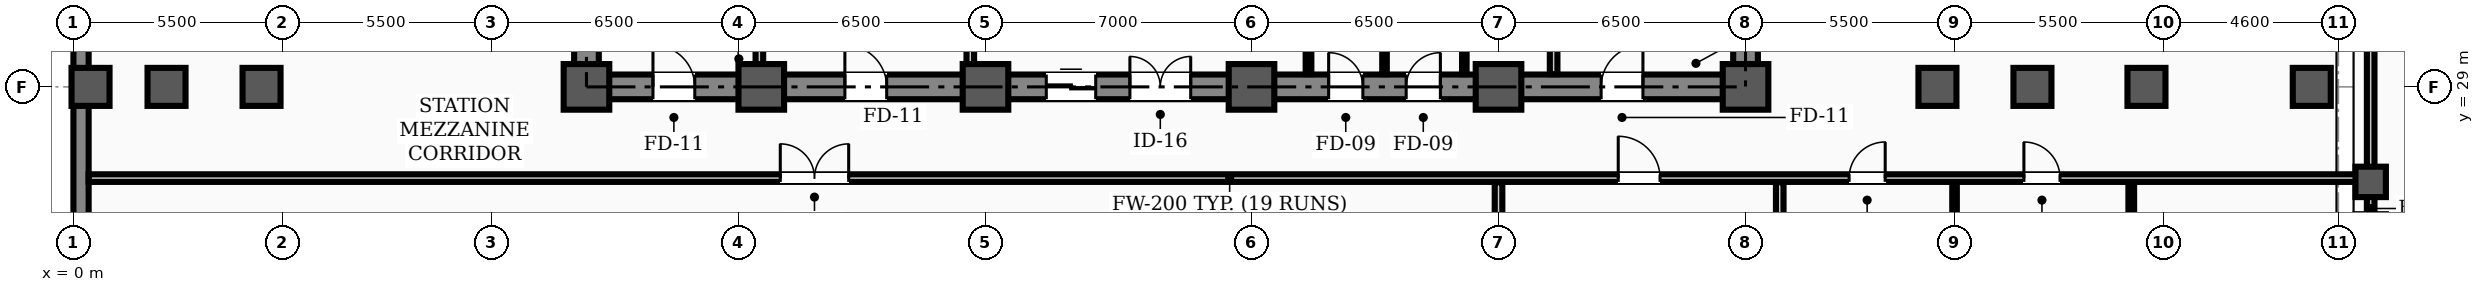
"""IFC4 building model, lengths in metres.
Left out: names, types, materials, properties, quantities, classifications, styles, units other than length and angle.
Written with IfcOpenShell. Run it as: python <this file> out.ifc"""

import sys

from ifc_helpers import new_model, si_unit, direction, frame, frame_2d, origin, origin_2d, place, context, subcontext, project, spatial, rectangle, hollow_rectangle, extrude, element, fill, save


model = new_model("IFC4")
c1 = context("Model", 3, precision=1e-05, world=origin(), true_north=direction((0.0, 1.0)))
c2 = subcontext(c1, "Body", "Model", "MODEL_VIEW")
j1 = project(units=[si_unit("LENGTHUNIT", "METRE"), si_unit("PLANEANGLEUNIT", "RADIAN")], contexts=[c1])
p1 = place(None, origin())
s1 = spatial("IfcSite", under=j1, at=p1, CompositionType="ELEMENT")
p2 = place(p1, origin())
s2 = spatial("IfcBuilding", under=s1, at=p2, CompositionType="ELEMENT")
p3 = place(p2, frame((0.0, 0.0, -10.2)))
s3 = spatial("IfcBuildingStorey", under=s2, at=p3, CompositionType="ELEMENT", Elevation=-10.2)
for number, where, z_axis, x_axis in (
    (1, (13.5, 29.0, 0.0), (0.0, 0.0, 1.0), (1.0, 0.0, 0.0)),
    (2, (18.1, 29.0, 0.0), (0.0, 0.0, 1.0), (1.0, 0.0, 0.0)),
    (3, (24.0, 29.0, 0.0), (0.0, 0.0, 1.0), (1.0, 0.0, 0.0)),
    (4, (31.0, 29.0, 0.0), (0.0, 0.0, 1.0), (1.0, 0.0, 0.0)),
    (5, (37.5, 29.0, 0.0), (0.0, 0.0, 1.0), (1.0, 0.0, 0.0)),
    (6, (44.0, 29.0, 0.0), (0.0, 0.0, 1.0), (1.0, 0.0, 0.0)),
):
    element("IfcColumn", number, at=place(p3, frame(where, z_axis=z_axis, x_axis=x_axis)), inside=s3, PredefinedType="COLUMN", context=c2, shape_type="SweptSolid", body=[
        extrude(hollow_rectangle(XDim=1.2, YDim=1.2, WallThickness=0.04, InnerFilletRadius=0.02, OuterFilletRadius=0.06, at=origin_2d()), origin(), (0.0, 0.0, 1.0), 5.2),
    ])
for number, where, z_axis, x_axis in (
    (7, (0.45, 29.0, 0.0), (0.0, 0.0, 1.0), (1.0, 0.0, 0.0)),
    (8, (2.45, 29.0, 0.0), (0.0, 0.0, 1.0), (1.0, 0.0, 0.0)),
    (9, (4.95, 29.0, 0.0), (0.0, 0.0, 1.0), (1.0, 0.0, 0.0)),
    (10, (49.05, 29.0, 0.0), (0.0, 0.0, 1.0), (1.0, 0.0, 0.0)),
    (11, (51.55, 29.0, 0.0), (0.0, 0.0, 1.0), (1.0, 0.0, 0.0)),
    (12, (54.55, 29.0, 0.0), (0.0, 0.0, 1.0), (1.0, 0.0, 0.0)),
    (13, (58.9, 29.0, 0.0), (0.0, 0.0, 1.0), (1.0, 0.0, 0.0)),
):
    element("IfcColumn", number, at=place(p3, frame(where, z_axis=z_axis, x_axis=x_axis)), inside=s3, PredefinedType="COLUMN", context=c2, shape_type="SweptSolid", body=[
        extrude(rectangle(XDim=1.0, YDim=1.0, at=origin_2d()), origin(), (0.0, 0.0, 1.0), 5.2),
    ])
p4 = place(p3, frame((60.45, 26.5, 0.0), z_axis=(0.0, 0.0, 1.0), x_axis=(1.0, 0.0, 0.0)))
e14 = element("IfcColumn", 14, at=p4, inside=s3, PredefinedType="COLUMN", context=c2, shape_type="SweptSolid", body=[
    extrude(rectangle(XDim=0.8, YDim=0.8, at=origin_2d()), origin(), (0.0, 0.0, 1.0), 5.2),
])
p5 = place(p3, frame((0.2, 51.4, 0.0), z_axis=(0.0, 0.0, 1.0), x_axis=(0.0, -1.0, 0.0)))
e15 = element("IfcWall", 15, at=p5, inside=s3, PredefinedType="SOLIDWALL", context=c2, shape_type="SweptSolid", body=[
    extrude(rectangle(XDim=51.2, YDim=0.4, at=frame_2d((25.6, 0.0))), origin(), (0.0, 0.0, 1.0), 4.92),
])
p6 = place(p3, frame((13.5, 29.0, 0.0), z_axis=(0.0, 0.0, 1.0), x_axis=(1.0, 0.0, 0.0)))
e16 = element("IfcWall", 16, at=p6, inside=s3, PredefinedType="SHEAR", context=c2, shape_type="SweptSolid", body=[
    extrude(rectangle(XDim=30.5, YDim=0.65, at=frame_2d((15.25, 0.0))), origin(), (0.0, 0.0, 1.0), 4.92),
])
p7 = place(p6, frame((1.75, 0.0, 0.0)))
e17 = element("IfcOpeningElement", 17, at=p7, cuts=e16, PredefinedType="OPENING", context=c2, shape_type="SweptSolid", body=[
    extrude(rectangle(XDim=1.1, YDim=2.08, at=frame_2d((0.55, 1.04))), frame((0.0, 0.335, 0.0), z_axis=(0.0, -1.0, 0.0), x_axis=(1.0, 0.0, 0.0)), (0.0, 0.0, 1.0), 0.67),
])
p8 = place(p6, frame((26.7, 0.0, 0.0)))
e18 = element("IfcOpeningElement", 18, at=p8, cuts=e16, PredefinedType="OPENING", context=c2, shape_type="SweptSolid", body=[
    extrude(rectangle(XDim=1.1, YDim=2.08, at=frame_2d((0.55, 1.04))), frame((0.0, 0.335, 0.0), z_axis=(0.0, -1.0, 0.0), x_axis=(1.0, 0.0, 0.0)), (0.0, 0.0, 1.0), 0.67),
])
p9 = place(p6, frame((6.8, 0.0, 0.0)))
e19 = element("IfcOpeningElement", 19, at=p9, cuts=e16, PredefinedType="OPENING", context=c2, shape_type="SweptSolid", body=[
    extrude(rectangle(XDim=1.1, YDim=2.08, at=frame_2d((0.55, 1.04))), frame((0.0, 0.335, 0.0), z_axis=(0.0, -1.0, 0.0), x_axis=(1.0, 0.0, 0.0)), (0.0, 0.0, 1.0), 0.67),
])
p10 = place(p6, frame((14.3, 0.0, 0.0)))
e20 = element("IfcOpeningElement", 20, at=p10, cuts=e16, PredefinedType="OPENING", context=c2, shape_type="SweptSolid", body=[
    extrude(rectangle(XDim=1.6, YDim=2.08, at=frame_2d((0.8, 1.04))), frame((0.0, 0.335, 0.0), z_axis=(0.0, -1.0, 0.0), x_axis=(1.0, 0.0, 0.0)), (0.0, 0.0, 1.0), 0.67),
])
p11 = place(p6, frame((19.53, 0.0, 0.0)))
e21 = element("IfcOpeningElement", 21, at=p11, cuts=e16, PredefinedType="OPENING", context=c2, shape_type="SweptSolid", body=[
    extrude(rectangle(XDim=0.9, YDim=2.08, at=frame_2d((0.45, 1.04))), frame((0.0, 0.335, 0.0), z_axis=(0.0, -1.0, 0.0), x_axis=(1.0, 0.0, 0.0)), (0.0, 0.0, 1.0), 0.67),
])
p12 = place(p6, frame((21.57, 0.0, 0.0)))
e22 = element("IfcOpeningElement", 22, at=p12, cuts=e16, PredefinedType="OPENING", context=c2, shape_type="SweptSolid", body=[
    extrude(rectangle(XDim=0.9, YDim=2.08, at=frame_2d((0.45, 1.04))), frame((0.0, 0.335, 0.0), z_axis=(0.0, -1.0, 0.0), x_axis=(1.0, 0.0, 0.0)), (0.0, 0.0, 1.0), 0.67),
])
p13 = place(p6, frame((12.1, 0.0, 0.0)))
e23 = element("IfcOpeningElement", 23, at=p13, cuts=e16, PredefinedType="OPENING", context=c2, shape_type="SweptSolid", body=[
    extrude(rectangle(XDim=1.3, YDim=2.08, at=frame_2d((0.65, 1.04))), frame((0.0, 0.335, 0.0), z_axis=(0.0, -1.0, 0.0), x_axis=(1.0, 0.0, 0.0)), (0.0, 0.0, 1.0), 0.67),
])
for number, where, z_axis, x_axis in (
    (24, (13.5, 29.35, 0.0), (0.0, 0.0, 1.0), (0.0, 1.0, 0.0)),
    (25, (44.0, 29.35, 0.0), (0.0, 0.0, 1.0), (0.0, 1.0, 0.0)),
):
    element("IfcWall", number, at=place(p3, frame(where, z_axis=z_axis, x_axis=x_axis)), inside=s3, PredefinedType="SHEAR", context=c2, shape_type="SweptSolid", body=[
        extrude(rectangle(XDim=8.6, YDim=0.65, at=frame_2d((4.3, 0.0))), origin(), (0.0, 0.0, 1.0), 4.92),
    ])
p14 = place(p3, frame((0.4, 26.6, 0.0), z_axis=(0.0, 0.0, 1.0), x_axis=(1.0, 0.0, 0.0)))
e26 = element("IfcWall", 26, at=p14, inside=s3, PredefinedType="STANDARD", context=c2, shape_type="SweptSolid", body=[
    extrude(rectangle(XDim=60.05, YDim=0.2, at=frame_2d((30.025, 0.0))), origin(), (0.0, 0.0, 1.0), 4.2),
])
p15 = place(p14, frame((18.2, 0.0, 0.0)))
e27 = element("IfcOpeningElement", 27, at=p15, cuts=e26, PredefinedType="OPENING", context=c2, shape_type="SweptSolid", body=[
    extrude(rectangle(XDim=1.8, YDim=2.08, at=frame_2d((0.9, 1.04))), frame((0.0, 0.11, 0.0), z_axis=(0.0, -1.0, 0.0), x_axis=(1.0, 0.0, 0.0)), (0.0, 0.0, 1.0), 0.22),
])
p16 = place(p14, frame((40.25, 0.0, 0.0)))
e28 = element("IfcOpeningElement", 28, at=p16, cuts=e26, PredefinedType="OPENING", context=c2, shape_type="SweptSolid", body=[
    extrude(rectangle(XDim=1.1, YDim=2.08, at=frame_2d((0.55, 1.04))), frame((0.0, 0.11, 0.0), z_axis=(0.0, -1.0, 0.0), x_axis=(1.0, 0.0, 0.0)), (0.0, 0.0, 1.0), 0.22),
])
p17 = place(p14, frame((46.325, 0.0, 0.0)))
e29 = element("IfcOpeningElement", 29, at=p17, cuts=e26, PredefinedType="OPENING", context=c2, shape_type="SweptSolid", body=[
    extrude(rectangle(XDim=0.95, YDim=2.08, at=frame_2d((0.475, 1.04))), frame((0.0, 0.11, 0.0), z_axis=(0.0, -1.0, 0.0), x_axis=(1.0, 0.0, 0.0)), (0.0, 0.0, 1.0), 0.22),
])
p18 = place(p14, frame((50.925, 0.0, 0.0)))
e30 = element("IfcOpeningElement", 30, at=p18, cuts=e26, PredefinedType="OPENING", context=c2, shape_type="SweptSolid", body=[
    extrude(rectangle(XDim=0.95, YDim=2.08, at=frame_2d((0.475, 1.04))), frame((0.0, 0.11, 0.0), z_axis=(0.0, -1.0, 0.0), x_axis=(1.0, 0.0, 0.0)), (0.0, 0.0, 1.0), 0.22),
])
for number, where, z_axis, x_axis in (
    (31, (37.5, 0.4, 0.0), (0.0, 0.0, 1.0), (0.0, 1.0, 0.0)),
    (32, (44.9, 0.4, 0.0), (0.0, 0.0, 1.0), (0.0, 1.0, 0.0)),
):
    element("IfcWall", number, at=place(p3, frame(where, z_axis=z_axis, x_axis=x_axis)), inside=s3, PredefinedType="STANDARD", context=c2, shape_type="SweptSolid", body=[
        extrude(rectangle(XDim=26.09, YDim=0.2, at=frame_2d((13.045, 0.0))), origin(), (0.0, 0.0, 1.0), 4.1),
    ])
p19 = place(p3, frame((49.5, 20.585, 0.0), z_axis=(0.0, 0.0, 1.0), x_axis=(0.0, 1.0, 0.0)))
e33 = element("IfcWall", 33, at=p19, inside=s3, PredefinedType="PARTITIONING", context=c2, shape_type="SweptSolid", body=[
    extrude(rectangle(XDim=5.905, YDim=0.12, at=frame_2d((2.953, 0.0))), origin(), (0.0, 0.0, 1.0), 4.1),
])
p20 = place(p3, frame((54.15, 20.585, 0.0), z_axis=(0.0, 0.0, 1.0), x_axis=(0.0, 1.0, 0.0)))
e34 = element("IfcWall", 34, at=p20, inside=s3, PredefinedType="PARTITIONING", context=c2, shape_type="SweptSolid", body=[
    extrude(rectangle(XDim=5.905, YDim=0.15, at=frame_2d((2.953, 0.0))), origin(), (0.0, 0.0, 1.0), 4.1),
])
p21 = place(p3, frame((60.45, 0.4, 0.0), z_axis=(0.0, 0.0, 1.0), x_axis=(0.0, 1.0, 0.0)))
e35 = element("IfcWall", 35, at=p21, inside=s3, PredefinedType="STANDARD", context=c2, shape_type="SweptSolid", body=[
    extrude(rectangle(XDim=50.8, YDim=0.2, at=frame_2d((25.4, 0.0))), origin(), (0.0, 0.0, 1.0), 4.2),
])
p22 = place(p21, frame((30.85, 0.0, 0.0)))
e36 = element("IfcOpeningElement", 36, at=p22, cuts=e35, PredefinedType="OPENING", context=c2, shape_type="SweptSolid", body=[
    extrude(rectangle(XDim=1.1, YDim=2.08, at=frame_2d((0.55, 1.04))), frame((0.0, 0.11, 0.0), z_axis=(0.0, -1.0, 0.0), x_axis=(1.0, 0.0, 0.0)), (0.0, 0.0, 1.0), 0.22),
])
for number, where, z_axis, x_axis in (
    (37, (18.05, 29.335, 0.0), (0.0, 0.0, 1.0), (0.0, 1.0, 0.0)),
    (38, (38.95, 29.335, 0.0), (0.0, 0.0, 1.0), (0.0, 1.0, 0.0)),
):
    element("IfcWall", number, at=place(p3, frame(where, z_axis=z_axis, x_axis=x_axis)), inside=s3, PredefinedType="STANDARD", context=c2, shape_type="SweptSolid", body=[
        extrude(rectangle(XDim=0.965, YDim=0.2, at=frame_2d((0.482, 0.0))), origin(), (0.0, 0.0, 1.0), 4.1),
    ])
p23 = place(p3, frame((23.6, 29.335, 0.0), z_axis=(0.0, 0.0, 1.0), x_axis=(0.0, 1.0, 0.0)))
e39 = element("IfcWall", 39, at=p23, inside=s3, PredefinedType="STANDARD", context=c2, shape_type="SweptSolid", body=[
    extrude(rectangle(XDim=5.365, YDim=0.2, at=frame_2d((2.683, 0.0))), origin(), (0.0, 0.0, 1.0), 4.1),
])
p24 = place(p3, frame((32.5, 29.335, 0.0), z_axis=(0.0, 0.0, 1.0), x_axis=(0.0, 1.0, 0.0)))
e40 = element("IfcWall", 40, at=p24, inside=s3, PredefinedType="PARTITIONING", context=c2, shape_type="SweptSolid", body=[
    extrude(rectangle(XDim=2.43, YDim=0.15, at=frame_2d((1.215, 0.0))), origin(), (0.0, 0.0, 1.0), 4.1),
])
for number, where, z_axis, x_axis in (
    (41, (36.6, 29.335, 0.0), (0.0, 0.0, 1.0), (0.0, 1.0, 0.0)),
    (42, (34.5, 29.335, 0.0), (0.0, 0.0, 1.0), (0.0, 1.0, 0.0)),
):
    element("IfcWall", number, at=place(p3, frame(where, z_axis=z_axis, x_axis=x_axis)), inside=s3, PredefinedType="PARTITIONING", context=c2, shape_type="SweptSolid", body=[
        extrude(rectangle(XDim=2.43, YDim=0.12, at=frame_2d((1.215, 0.0))), origin(), (0.0, 0.0, 1.0), 4.1),
    ])
p25 = place(p15, origin())
e43 = element("IfcDoor", 43, at=p25, inside=s3, OperationType="DOUBLE_DOOR_SINGLE_SWING", PredefinedType="DOOR", context=c2, shape_type="SweptSolid", body=[
    extrude(rectangle(XDim=1.8, YDim=2.08, at=frame_2d((0.9, 1.04))), frame((0.0, 0.025, 0.0), z_axis=(0.0, -1.0, 0.0), x_axis=(1.0, 0.0, 0.0)), (0.0, 0.0, 1.0), 0.05),
])
fill(e27, e43)
p26 = place(p16, origin())
e44 = element("IfcDoor", 44, at=p26, inside=s3, OperationType="SINGLE_SWING_LEFT", PredefinedType="DOOR", context=c2, shape_type="SweptSolid", body=[
    extrude(rectangle(XDim=1.1, YDim=2.08, at=frame_2d((0.55, 1.04))), frame((0.0, 0.025, 0.0), z_axis=(0.0, -1.0, 0.0), x_axis=(1.0, 0.0, 0.0)), (0.0, 0.0, 1.0), 0.05),
])
fill(e28, e44)
p27 = place(p17, origin())
e45 = element("IfcDoor", 45, at=p27, inside=s3, OperationType="SINGLE_SWING_RIGHT", PredefinedType="DOOR", context=c2, shape_type="SweptSolid", body=[
    extrude(rectangle(XDim=0.95, YDim=2.08, at=frame_2d((0.475, 1.04))), frame((0.0, 0.025, 0.0), z_axis=(0.0, -1.0, 0.0), x_axis=(1.0, 0.0, 0.0)), (0.0, 0.0, 1.0), 0.05),
])
fill(e29, e45)
p28 = place(p18, origin())
e46 = element("IfcDoor", 46, at=p28, inside=s3, OperationType="SINGLE_SWING_LEFT", PredefinedType="DOOR", context=c2, shape_type="SweptSolid", body=[
    extrude(rectangle(XDim=0.95, YDim=2.08, at=frame_2d((0.475, 1.04))), frame((0.0, 0.025, 0.0), z_axis=(0.0, -1.0, 0.0), x_axis=(1.0, 0.0, 0.0)), (0.0, 0.0, 1.0), 0.05),
])
fill(e30, e46)
p29 = place(p7, origin())
e47 = element("IfcDoor", 47, at=p29, inside=s3, OperationType="SINGLE_SWING_LEFT", PredefinedType="DOOR", context=c2, shape_type="SweptSolid", body=[
    extrude(rectangle(XDim=1.1, YDim=2.08, at=frame_2d((0.55, 1.04))), frame((0.0, 0.025, 0.0), z_axis=(0.0, -1.0, 0.0), x_axis=(1.0, 0.0, 0.0)), (0.0, 0.0, 1.0), 0.05),
])
fill(e17, e47)
p30 = place(p8, origin())
e48 = element("IfcDoor", 48, at=p30, inside=s3, OperationType="SINGLE_SWING_RIGHT", PredefinedType="DOOR", context=c2, shape_type="SweptSolid", body=[
    extrude(rectangle(XDim=1.1, YDim=2.08, at=frame_2d((0.55, 1.04))), frame((0.0, 0.025, 0.0), z_axis=(0.0, -1.0, 0.0), x_axis=(1.0, 0.0, 0.0)), (0.0, 0.0, 1.0), 0.05),
])
fill(e18, e48)
p31 = place(p9, origin())
e49 = element("IfcDoor", 49, at=p31, inside=s3, OperationType="SINGLE_SWING_LEFT", PredefinedType="DOOR", context=c2, shape_type="SweptSolid", body=[
    extrude(rectangle(XDim=1.1, YDim=2.08, at=frame_2d((0.55, 1.04))), frame((0.0, 0.025, 0.0), z_axis=(0.0, -1.0, 0.0), x_axis=(1.0, 0.0, 0.0)), (0.0, 0.0, 1.0), 0.05),
])
fill(e19, e49)
p32 = place(p10, origin())
e50 = element("IfcDoor", 50, at=p32, inside=s3, OperationType="DOUBLE_DOOR_SINGLE_SWING", PredefinedType="DOOR", context=c2, shape_type="SweptSolid", body=[
    extrude(rectangle(XDim=1.6, YDim=2.08, at=frame_2d((0.8, 1.04))), frame((0.0, 0.025, 0.0), z_axis=(0.0, -1.0, 0.0), x_axis=(1.0, 0.0, 0.0)), (0.0, 0.0, 1.0), 0.05),
])
fill(e20, e50)
p33 = place(p11, origin())
e51 = element("IfcDoor", 51, at=p33, inside=s3, OperationType="SINGLE_SWING_LEFT", PredefinedType="DOOR", context=c2, shape_type="SweptSolid", body=[
    extrude(rectangle(XDim=0.9, YDim=2.08, at=frame_2d((0.45, 1.04))), frame((0.0, 0.025, 0.0), z_axis=(0.0, -1.0, 0.0), x_axis=(1.0, 0.0, 0.0)), (0.0, 0.0, 1.0), 0.05),
])
fill(e21, e51)
p34 = place(p12, origin())
e52 = element("IfcDoor", 52, at=p34, inside=s3, OperationType="SINGLE_SWING_RIGHT", PredefinedType="DOOR", context=c2, shape_type="SweptSolid", body=[
    extrude(rectangle(XDim=0.9, YDim=2.08, at=frame_2d((0.45, 1.04))), frame((0.0, 0.025, 0.0), z_axis=(0.0, -1.0, 0.0), x_axis=(1.0, 0.0, 0.0)), (0.0, 0.0, 1.0), 0.05),
])
fill(e22, e52)
p35 = place(p13, origin())
e53 = element("IfcDoor", 53, at=p35, inside=s3, OperationType="DOUBLE_DOOR_SLIDING", PredefinedType="DOOR", context=c2, shape_type="SweptSolid", body=[
    extrude(rectangle(XDim=1.3, YDim=2.08, at=frame_2d((0.65, 1.04))), frame((0.0, 0.025, 0.0), z_axis=(0.0, -1.0, 0.0), x_axis=(1.0, 0.0, 0.0)), (0.0, 0.0, 1.0), 0.05),
])
fill(e23, e53)
save(model, sys.argv[1])
